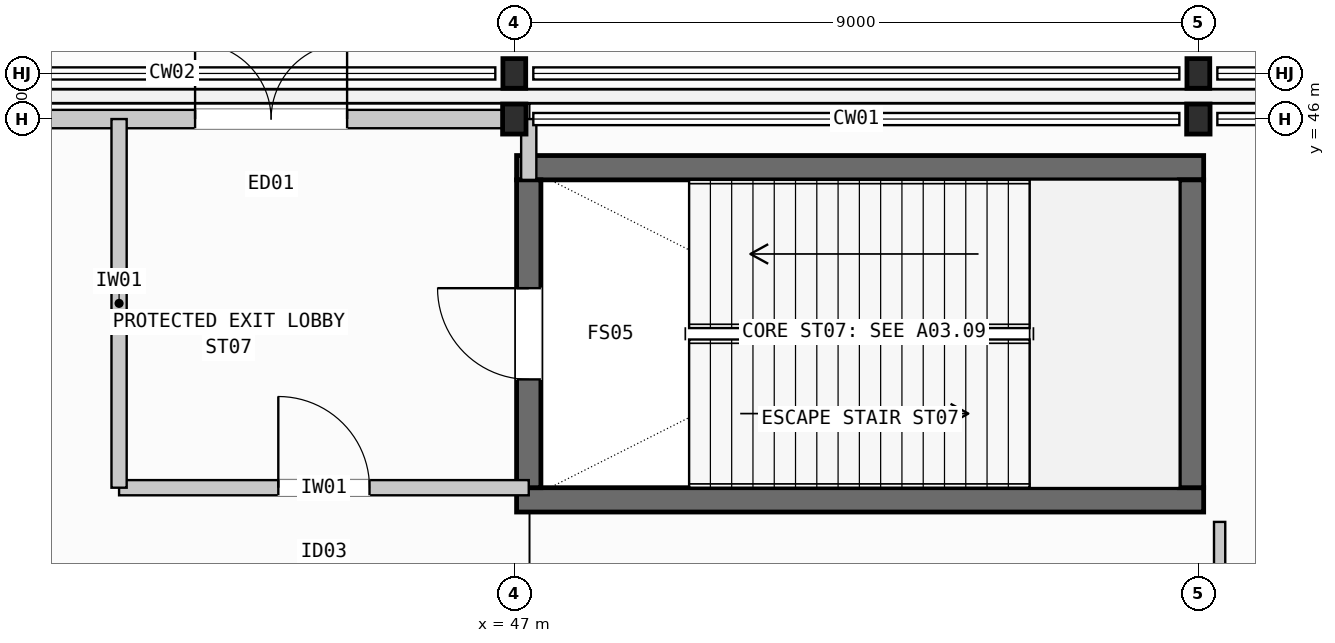
"""IFC4 building model, lengths in metres.
Left out: names, types, materials, properties, quantities, classifications, styles, units other than length and angle.
Written with IfcOpenShell. Run it as: python <this file> out.ifc"""

import sys

from ifc_helpers import new_model, si_unit, direction, frame, frame_2d, origin, origin_2d, place, context, subcontext, project, spatial, rectangle, i_section, extrude, element, fill, save


model = new_model("IFC4")
c1 = context("Model", 3, precision=1e-05, world=origin(), true_north=direction((0.0, 1.0)))
c2 = subcontext(c1, "Body", "Model", "MODEL_VIEW")
j1 = project(units=[si_unit("LENGTHUNIT", "METRE"), si_unit("PLANEANGLEUNIT", "RADIAN")], contexts=[c1])
p1 = place(None, origin())
s1 = spatial("IfcSite", under=j1, at=p1, CompositionType="ELEMENT")
p2 = place(p1, origin())
s2 = spatial("IfcBuilding", under=s1, at=p2, CompositionType="ELEMENT")
p3 = place(p2, origin())
s3 = spatial("IfcBuildingStorey", under=s2, at=p3, CompositionType="ELEMENT", Elevation=0.0)
p4 = place(p3, frame((47.0, 46.0, 0.0), z_axis=(0.0, 0.0, 1.0), x_axis=(1.0, 0.0, 0.0)))
e1 = element("IfcColumn", 1, at=p4, inside=s3, PredefinedType="COLUMN", context=c2, shape_type="SweptSolid", body=[
    extrude(i_section(OverallWidth=0.308, OverallDepth=0.395, WebThickness=0.021, FlangeThickness=0.04, FilletRadius=0.027, at=origin_2d()), origin(), (0.0, 0.0, 1.0), 6.0),
])
p5 = place(p3, frame((47.0, 46.6, 0.0), z_axis=(0.0, 0.0, 1.0), x_axis=(1.0, 0.0, 0.0)))
e2 = element("IfcColumn", 2, at=p5, inside=s3, PredefinedType="COLUMN", context=c2, shape_type="SweptSolid", body=[
    extrude(i_section(OverallWidth=0.3, OverallDepth=0.39, WebThickness=0.011, FlangeThickness=0.019, FilletRadius=0.027, at=origin_2d()), origin(), (0.0, 0.0, 1.0), 6.0),
])
p6 = place(p3, frame((56.0, 46.0, 0.0), z_axis=(0.0, 0.0, 1.0), x_axis=(1.0, 0.0, 0.0)))
e3 = element("IfcColumn", 3, at=p6, inside=s3, PredefinedType="COLUMN", context=c2, shape_type="SweptSolid", body=[
    extrude(i_section(OverallWidth=0.308, OverallDepth=0.395, WebThickness=0.021, FlangeThickness=0.04, FilletRadius=0.027, at=origin_2d()), origin(), (0.0, 0.0, 1.0), 6.0),
])
p7 = place(p3, frame((56.0, 46.6, 0.0), z_axis=(0.0, 0.0, 1.0), x_axis=(1.0, 0.0, 0.0)))
e4 = element("IfcColumn", 4, at=p7, inside=s3, PredefinedType="COLUMN", context=c2, shape_type="SweptSolid", body=[
    extrude(i_section(OverallWidth=0.3, OverallDepth=0.39, WebThickness=0.011, FlangeThickness=0.019, FilletRadius=0.027, at=origin_2d()), origin(), (0.0, 0.0, 1.0), 6.0),
])
for number, where, z_axis, x_axis in (
    (5, (47.03, 40.99, 0.0), (0.0, 0.0, 1.0), (1.0, 0.0, 0.0)),
    (6, (47.03, 45.36, 0.0), (0.0, 0.0, 1.0), (1.0, 0.0, 0.0)),
):
    element("IfcWall", number, at=place(p3, frame(where, z_axis=z_axis, x_axis=x_axis)), inside=s3, PredefinedType="SHEAR", context=c2, shape_type="SweptSolid", body=[
        extrude(rectangle(XDim=9.04, YDim=0.32, at=frame_2d((4.52, 0.0))), origin(), (0.0, 0.0, 1.0), 6.0),
    ])
p8 = place(p3, frame((47.19, 41.15, 0.0), z_axis=(0.0, 0.0, 1.0), x_axis=(0.0, 1.0, 0.0)))
e7 = element("IfcWall", 7, at=p8, inside=s3, PredefinedType="SHEAR", context=c2, shape_type="SweptSolid", body=[
    extrude(rectangle(XDim=4.05, YDim=0.32, at=frame_2d((2.025, 0.0))), origin(), (0.0, 0.0, 1.0), 6.0),
])
p9 = place(p8, frame((1.425, 0.0, 0.0)))
e8 = element("IfcOpeningElement", 8, at=p9, cuts=e7, PredefinedType="OPENING", context=c2, shape_type="SweptSolid", body=[
    extrude(rectangle(XDim=1.2, YDim=2.2, at=frame_2d((0.6, 1.1))), frame((0.0, 0.17, 0.0), z_axis=(0.0, -1.0, 0.0), x_axis=(1.0, 0.0, 0.0)), (0.0, 0.0, 1.0), 0.34),
])
p10 = place(p3, frame((55.91, 41.15, 0.0), z_axis=(0.0, 0.0, 1.0), x_axis=(0.0, 1.0, 0.0)))
e9 = element("IfcWall", 9, at=p10, inside=s3, PredefinedType="SHEAR", context=c2, shape_type="SweptSolid", body=[
    extrude(rectangle(XDim=4.05, YDim=0.32, at=frame_2d((2.025, 0.0))), origin(), (0.0, 0.0, 1.0), 6.0),
])
p11 = place(p3, frame((38.15, 46.0, 0.0), z_axis=(0.0, 0.0, 1.0), x_axis=(1.0, 0.0, 0.0)))
e10 = element("IfcWall", 10, at=p11, inside=s3, PredefinedType="STANDARD", context=c2, shape_type="SweptSolid", body=[
    extrude(rectangle(XDim=8.7, YDim=0.242, at=frame_2d((4.35, 0.0))), origin(), (0.0, 0.0, 1.0), 5.098),
])
p12 = place(p11, frame((4.65, 0.0, 0.0)))
e11 = element("IfcOpeningElement", 11, at=p12, cuts=e10, PredefinedType="OPENING", context=c2, shape_type="SweptSolid", body=[
    extrude(rectangle(XDim=2.0, YDim=2.3, at=frame_2d((1.0, 1.15))), frame((0.0, 0.131, 0.0), z_axis=(0.0, -1.0, 0.0), x_axis=(1.0, 0.0, 0.0)), (0.0, 0.0, 1.0), 0.262),
])
p13 = place(p3, frame((41.8, 41.15, 0.0), z_axis=(0.0, 0.0, 1.0), x_axis=(1.0, 0.0, 0.0)))
e12 = element("IfcWall", 12, at=p13, inside=s3, PredefinedType="PARTITIONING", context=c2, shape_type="SweptSolid", body=[
    extrude(rectangle(XDim=5.39, YDim=0.2, at=frame_2d((2.695, 0.0))), origin(), (0.0, 0.0, 1.0), 4.2),
])
p14 = place(p13, frame((2.095, 0.0, 0.0)))
e13 = element("IfcOpeningElement", 13, at=p14, cuts=e12, PredefinedType="OPENING", context=c2, shape_type="SweptSolid", body=[
    extrude(rectangle(XDim=1.2, YDim=2.2, at=frame_2d((0.6, 1.1))), frame((0.0, 0.11, 0.0), z_axis=(0.0, -1.0, 0.0), x_axis=(1.0, 0.0, 0.0)), (0.0, 0.0, 1.0), 0.22),
])
p15 = place(p3, frame((41.8, 41.15, 0.0), z_axis=(0.0, 0.0, 1.0), x_axis=(0.0, 1.0, 0.0)))
e14 = element("IfcWall", 14, at=p15, inside=s3, PredefinedType="PARTITIONING", context=c2, shape_type="SweptSolid", body=[
    extrude(rectangle(XDim=4.85, YDim=0.2, at=frame_2d((2.425, 0.0))), origin(), (0.0, 0.0, 1.0), 4.2),
])
p16 = place(p3, frame((47.19, 45.2, 0.0), z_axis=(0.0, 0.0, 1.0), x_axis=(0.0, 1.0, 0.0)))
e15 = element("IfcWall", 15, at=p16, inside=s3, PredefinedType="PARTITIONING", context=c2, shape_type="SweptSolid", body=[
    extrude(rectangle(XDim=0.8, YDim=0.2, at=frame_2d((0.4, 0.0))), origin(), (0.0, 0.0, 1.0), 4.2),
])
p17 = place(p3, frame((56.28, 24.1, 0.0), z_axis=(0.0, 0.0, 1.0), x_axis=(0.0, 1.0, 0.0)))
e16 = element("IfcWall", 16, at=p17, inside=s3, PredefinedType="PARTITIONING", context=c2, shape_type="SweptSolid", body=[
    extrude(rectangle(XDim=16.6, YDim=0.148, at=frame_2d((8.3, 0.0))), origin(), (0.0, 0.0, 1.0), 4.9),
])
p18 = place(p17, frame((6.15, 0.0, 0.0)))
e17 = element("IfcOpeningElement", 17, at=p18, cuts=e16, PredefinedType="OPENING", context=c2, shape_type="SweptSolid", body=[
    extrude(rectangle(XDim=2.3, YDim=2.36, at=frame_2d((1.15, 1.18))), frame((0.0, 0.084, 0.0), z_axis=(0.0, -1.0, 0.0), x_axis=(1.0, 0.0, 0.0)), (0.0, 0.0, 1.0), 0.168),
])
p19 = place(p9, origin())
e18 = element("IfcDoor", 18, at=p19, inside=s3, OperationType="SINGLE_SWING_RIGHT", PredefinedType="DOOR", context=c2, shape_type="SweptSolid", body=[
    extrude(rectangle(XDim=1.2, YDim=2.2, at=frame_2d((0.6, 1.1))), frame((0.0, 0.025, 0.0), z_axis=(0.0, -1.0, 0.0), x_axis=(1.0, 0.0, 0.0)), (0.0, 0.0, 1.0), 0.05),
])
fill(e8, e18)
p20 = place(p12, origin())
e19 = element("IfcDoor", 19, at=p20, inside=s3, OperationType="DOUBLE_DOOR_SINGLE_SWING", PredefinedType="DOOR", context=c2, shape_type="SweptSolid", body=[
    extrude(rectangle(XDim=2.0, YDim=2.3, at=frame_2d((1.0, 1.15))), frame((0.0, 0.025, 0.0), z_axis=(0.0, -1.0, 0.0), x_axis=(1.0, 0.0, 0.0)), (0.0, 0.0, 1.0), 0.05),
])
fill(e11, e19)
p21 = place(p14, origin())
e20 = element("IfcDoor", 20, at=p21, inside=s3, OperationType="SINGLE_SWING_LEFT", PredefinedType="DOOR", context=c2, shape_type="SweptSolid", body=[
    extrude(rectangle(XDim=1.2, YDim=2.2, at=frame_2d((0.6, 1.1))), frame((0.0, 0.025, 0.0), z_axis=(0.0, -1.0, 0.0), x_axis=(1.0, 0.0, 0.0)), (0.0, 0.0, 1.0), 0.05),
])
fill(e13, e20)
save(model, sys.argv[1])
